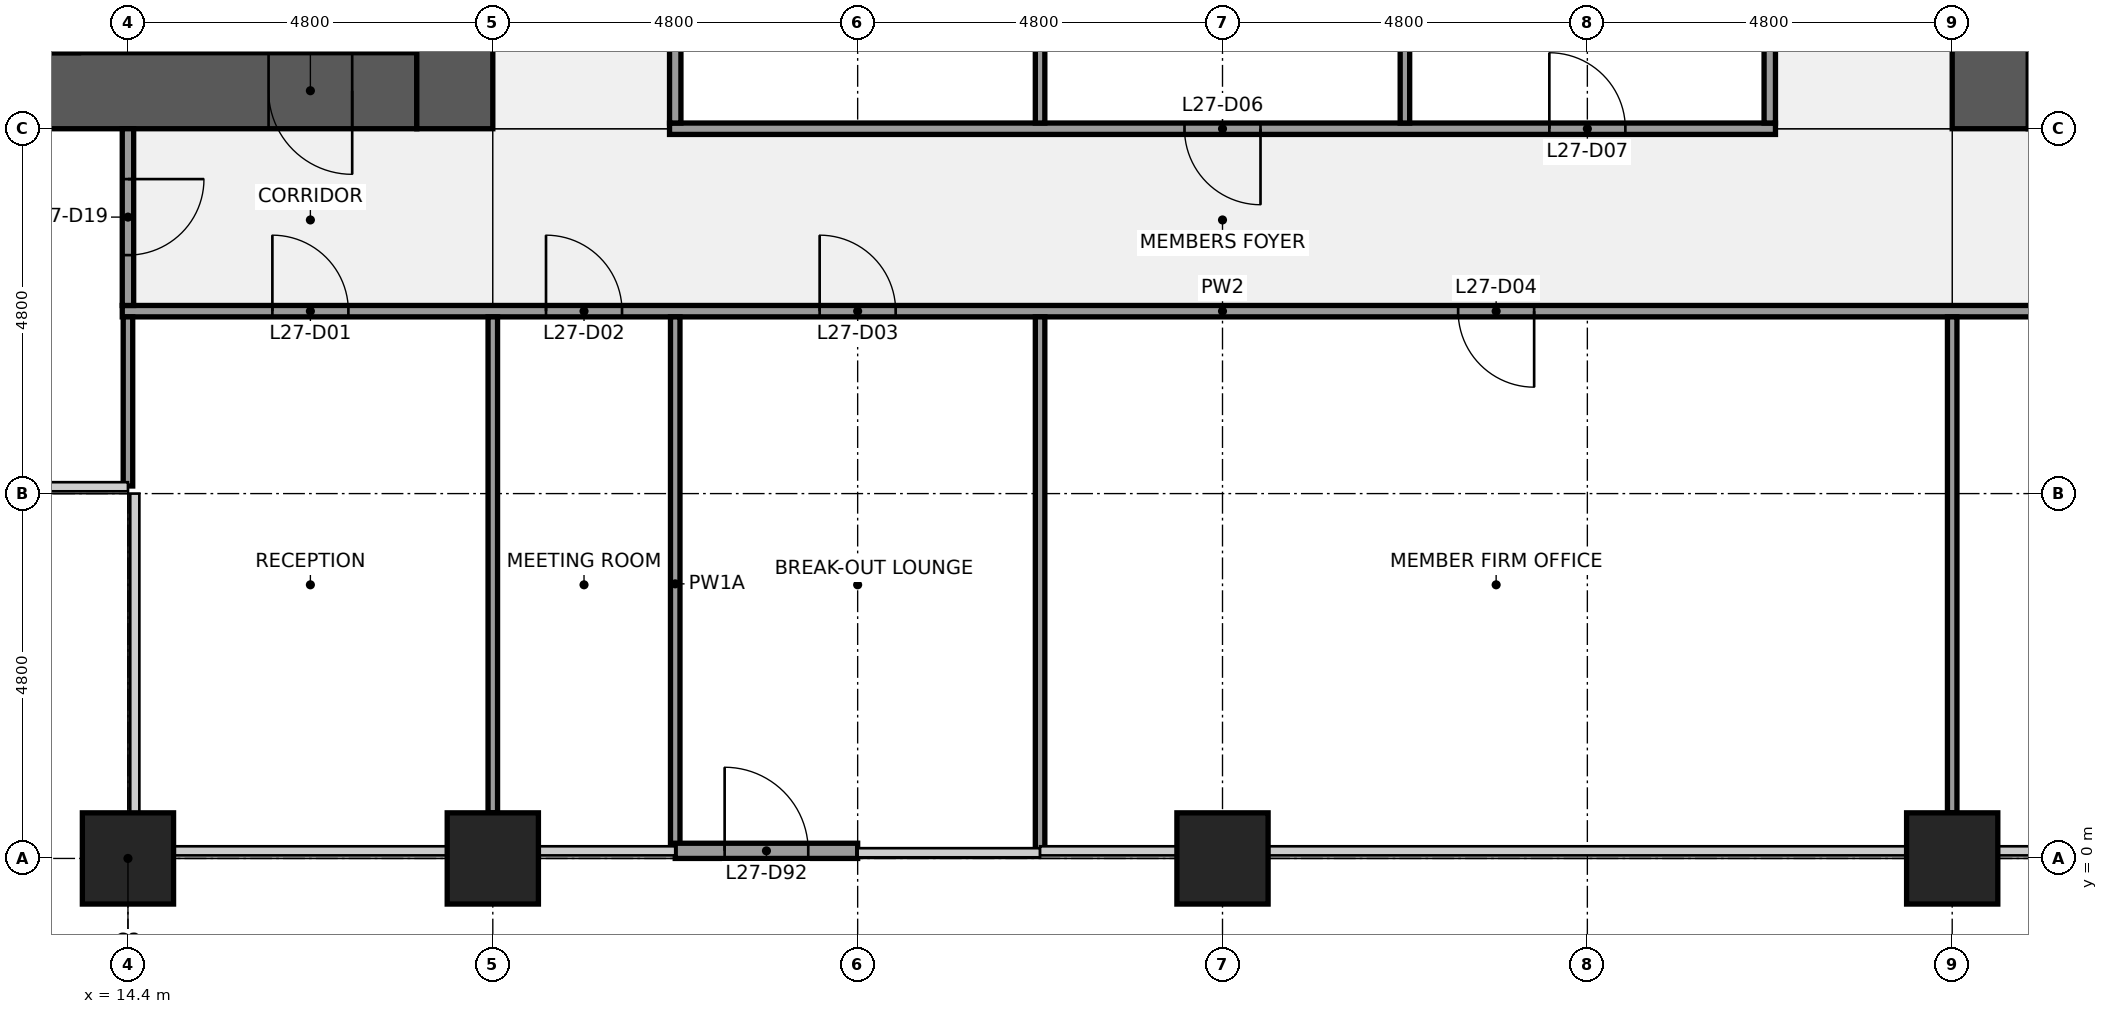
"""IFC4 building model, lengths in metres.
Left out: names, types, materials, properties, quantities, classifications, styles, units other than length and angle.
Written with IfcOpenShell. Run it as: python <this file> out.ifc"""

import sys

from ifc_helpers import new_model, si_unit, direction, frame, frame_2d, origin, origin_2d, place, context, subcontext, project, spatial, rectangle, extrude, element, fill, save


model = new_model("IFC4")
c1 = context("Model", 3, precision=1e-05, world=origin(), true_north=direction((0.0, 1.0)))
c2 = subcontext(c1, "Body", "Model", "MODEL_VIEW")
j1 = project(units=[si_unit("LENGTHUNIT", "METRE"), si_unit("PLANEANGLEUNIT", "RADIAN")], contexts=[c1])
p1 = place(None, origin())
s1 = spatial("IfcSite", under=j1, at=p1, CompositionType="ELEMENT")
p2 = place(p1, origin())
s2 = spatial("IfcBuilding", under=s1, at=p2, CompositionType="ELEMENT")
p3 = place(p2, frame((0.0, 0.0, 128.1)))
s3 = spatial("IfcBuildingStorey", under=s2, at=p3, CompositionType="ELEMENT", Elevation=128.1)
for number, where, z_axis, x_axis in (
    (1, (14.4, 0.0, 0.0), (0.0, 0.0, 1.0), (1.0, 0.0, 0.0)),
    (2, (19.2, 0.0, 0.0), (0.0, 0.0, 1.0), (1.0, 0.0, 0.0)),
    (3, (28.8, 0.0, 0.0), (0.0, 0.0, 1.0), (1.0, 0.0, 0.0)),
    (4, (38.4, 0.0, 0.0), (0.0, 0.0, 1.0), (1.0, 0.0, 0.0)),
):
    element("IfcColumn", number, at=place(p3, frame(where, z_axis=z_axis, x_axis=x_axis)), inside=s3, PredefinedType="COLUMN", context=c2, shape_type="SweptSolid", body=[
        extrude(rectangle(XDim=1.2, YDim=1.2, at=origin_2d()), origin(), (0.0, 0.0, 1.0), 4.0),
    ])
p4 = place(p3, frame((18.2, 10.1, 0.0), z_axis=(0.0, 0.0, 1.0), x_axis=(-1.0, 0.0, 0.0)))
e5 = element("IfcWall", 5, at=p4, inside=s3, PredefinedType="SHEAR", context=c2, shape_type="SweptSolid", body=[
    extrude(rectangle(XDim=8.6, YDim=1.0, at=frame_2d((4.3, 0.0))), origin(), (0.0, 0.0, 1.0), 3.84),
])
p5 = place(p4, frame((0.85, 0.0, 0.0)))
e6 = element("IfcOpeningElement", 6, at=p5, cuts=e5, PredefinedType="OPENING", context=c2, shape_type="SweptSolid", body=[
    extrude(rectangle(XDim=1.1, YDim=2.1, at=frame_2d((0.55, 1.05))), frame((0.0, 0.51, 0.0), z_axis=(0.0, -1.0, 0.0), x_axis=(1.0, 0.0, 0.0)), (0.0, 0.0, 1.0), 1.02),
])
p6 = place(p3, frame((18.7, 38.4, 0.0), z_axis=(0.0, 0.0, 1.0), x_axis=(0.0, -1.0, 0.0)))
e7 = element("IfcWall", 7, at=p6, inside=s3, PredefinedType="SHEAR", context=c2, shape_type="SweptSolid", body=[
    extrude(rectangle(XDim=28.8, YDim=1.0, at=frame_2d((14.4, 0.0))), origin(), (0.0, 0.0, 1.0), 3.84),
])
p7 = place(p6, frame((18.3, 0.0, 0.0)))
e8 = element("IfcOpeningElement", 8, at=p7, cuts=e7, PredefinedType="OPENING", context=c2, shape_type="SweptSolid", body=[
    extrude(rectangle(XDim=1.8, YDim=2.1, at=frame_2d((0.9, 1.05))), frame((0.0, 0.51, 0.0), z_axis=(0.0, -1.0, 0.0), x_axis=(1.0, 0.0, 0.0)), (0.0, 0.0, 1.0), 1.02),
])
p8 = place(p6, frame((8.7, 0.0, 0.0)))
e9 = element("IfcOpeningElement", 9, at=p8, cuts=e7, PredefinedType="OPENING", context=c2, shape_type="SweptSolid", body=[
    extrude(rectangle(XDim=1.8, YDim=2.1, at=frame_2d((0.9, 1.05))), frame((0.0, 0.51, 0.0), z_axis=(0.0, -1.0, 0.0), x_axis=(1.0, 0.0, 0.0)), (0.0, 0.0, 1.0), 1.02),
])
p9 = place(p3, frame((9.6, 10.7, 0.0), z_axis=(0.0, 0.0, 1.0), x_axis=(1.0, 0.0, 0.0)))
e10 = element("IfcWall", 10, at=p9, inside=s3, PredefinedType="SHEAR", context=c2, shape_type="SweptSolid", body=[
    extrude(rectangle(XDim=4.15, YDim=0.2, at=frame_2d((2.075, 0.0))), origin(), (0.0, 0.0, 1.0), 3.84),
])
p10 = place(p3, frame((38.9, 9.6, 0.0), z_axis=(0.0, 0.0, 1.0), x_axis=(0.0, 1.0, 0.0)))
e11 = element("IfcWall", 11, at=p10, inside=s3, PredefinedType="SHEAR", context=c2, shape_type="SweptSolid", body=[
    extrude(rectangle(XDim=28.8, YDim=1.0, at=frame_2d((14.4, 0.0))), origin(), (0.0, 0.0, 1.0), 3.84),
])
p11 = place(p10, frame((8.7, 0.0, 0.0)))
e12 = element("IfcOpeningElement", 12, at=p11, cuts=e11, PredefinedType="OPENING", context=c2, shape_type="SweptSolid", body=[
    extrude(rectangle(XDim=1.8, YDim=2.1, at=frame_2d((0.9, 1.05))), frame((0.0, 0.51, 0.0), z_axis=(0.0, -1.0, 0.0), x_axis=(1.0, 0.0, 0.0)), (0.0, 0.0, 1.0), 1.02),
])
p12 = place(p10, frame((18.3, 0.0, 0.0)))
e13 = element("IfcOpeningElement", 13, at=p12, cuts=e11, PredefinedType="OPENING", context=c2, shape_type="SweptSolid", body=[
    extrude(rectangle(XDim=1.8, YDim=2.1, at=frame_2d((0.9, 1.05))), frame((0.0, 0.51, 0.0), z_axis=(0.0, -1.0, 0.0), x_axis=(1.0, 0.0, 0.0)), (0.0, 0.0, 1.0), 1.02),
])
p13 = place(p3, frame((14.325, 7.2, 0.0), z_axis=(0.0, 0.0, 1.0), x_axis=(1.0, 0.0, 0.0)))
e14 = element("IfcWall", 14, at=p13, inside=s3, PredefinedType="PARTITIONING", context=c2, shape_type="SweptSolid", body=[
    extrude(rectangle(XDim=28.95, YDim=0.15, at=frame_2d((14.475, 0.0))), origin(), (0.0, 0.0, 1.0), 2.936),
])
p14 = place(p13, frame((1.975, 0.0, 0.0)))
e15 = element("IfcOpeningElement", 15, at=p14, cuts=e14, PredefinedType="OPENING", context=c2, shape_type="SweptSolid", body=[
    extrude(rectangle(XDim=1.0, YDim=2.1, at=frame_2d((0.5, 1.05))), frame((0.0, 0.085, 0.0), z_axis=(0.0, -1.0, 0.0), x_axis=(1.0, 0.0, 0.0)), (0.0, 0.0, 1.0), 0.17),
])
p15 = place(p13, frame((5.575, 0.0, 0.0)))
e16 = element("IfcOpeningElement", 16, at=p15, cuts=e14, PredefinedType="OPENING", context=c2, shape_type="SweptSolid", body=[
    extrude(rectangle(XDim=1.0, YDim=2.1, at=frame_2d((0.5, 1.05))), frame((0.0, 0.085, 0.0), z_axis=(0.0, -1.0, 0.0), x_axis=(1.0, 0.0, 0.0)), (0.0, 0.0, 1.0), 0.17),
])
p16 = place(p13, frame((9.175, 0.0, 0.0)))
e17 = element("IfcOpeningElement", 17, at=p16, cuts=e14, PredefinedType="OPENING", context=c2, shape_type="SweptSolid", body=[
    extrude(rectangle(XDim=1.0, YDim=2.1, at=frame_2d((0.5, 1.05))), frame((0.0, 0.085, 0.0), z_axis=(0.0, -1.0, 0.0), x_axis=(1.0, 0.0, 0.0)), (0.0, 0.0, 1.0), 0.17),
])
p17 = place(p13, frame((17.575, 0.0, 0.0)))
e18 = element("IfcOpeningElement", 18, at=p17, cuts=e14, PredefinedType="OPENING", context=c2, shape_type="SweptSolid", body=[
    extrude(rectangle(XDim=1.0, YDim=2.1, at=frame_2d((0.5, 1.05))), frame((0.0, 0.085, 0.0), z_axis=(0.0, -1.0, 0.0), x_axis=(1.0, 0.0, 0.0)), (0.0, 0.0, 1.0), 0.17),
])
p18 = place(p13, frame((25.975, 0.0, 0.0)))
e19 = element("IfcOpeningElement", 19, at=p18, cuts=e14, PredefinedType="OPENING", context=c2, shape_type="SweptSolid", body=[
    extrude(rectangle(XDim=1.0, YDim=2.1, at=frame_2d((0.5, 1.05))), frame((0.0, 0.085, 0.0), z_axis=(0.0, -1.0, 0.0), x_axis=(1.0, 0.0, 0.0)), (0.0, 0.0, 1.0), 0.17),
])
p19 = place(p3, frame((21.525, 9.6, 0.0), z_axis=(0.0, 0.0, 1.0), x_axis=(1.0, 0.0, 0.0)))
e20 = element("IfcWall", 20, at=p19, inside=s3, PredefinedType="PARTITIONING", context=c2, shape_type="SweptSolid", body=[
    extrude(rectangle(XDim=14.55, YDim=0.15, at=frame_2d((7.275, 0.0))), origin(), (0.0, 0.0, 1.0), 2.936),
])
p20 = place(p19, frame((6.775, 0.0, 0.0)))
e21 = element("IfcOpeningElement", 21, at=p20, cuts=e20, PredefinedType="OPENING", context=c2, shape_type="SweptSolid", body=[
    extrude(rectangle(XDim=1.0, YDim=2.1, at=frame_2d((0.5, 1.05))), frame((0.0, 0.085, 0.0), z_axis=(0.0, -1.0, 0.0), x_axis=(1.0, 0.0, 0.0)), (0.0, 0.0, 1.0), 0.17),
])
p21 = place(p19, frame((11.575, 0.0, 0.0)))
e22 = element("IfcOpeningElement", 22, at=p21, cuts=e20, PredefinedType="OPENING", context=c2, shape_type="SweptSolid", body=[
    extrude(rectangle(XDim=1.0, YDim=2.1, at=frame_2d((0.5, 1.05))), frame((0.0, 0.085, 0.0), z_axis=(0.0, -1.0, 0.0), x_axis=(1.0, 0.0, 0.0)), (0.0, 0.0, 1.0), 0.17),
])
p22 = place(p3, frame((14.4, 4.9, 0.0), z_axis=(0.0, 0.0, 1.0), x_axis=(0.0, 1.0, 0.0)))
e23 = element("IfcWall", 23, at=p22, inside=s3, PredefinedType="PARTITIONING", context=c2, shape_type="SweptSolid", body=[
    extrude(rectangle(XDim=2.225, YDim=0.125, at=frame_2d((1.113, 0.0))), origin(), (0.0, 0.0, 1.0), 2.936),
])
p23 = place(p3, frame((14.4, 7.275, 0.0), z_axis=(0.0, 0.0, 1.0), x_axis=(0.0, 1.0, 0.0)))
e24 = element("IfcWall", 24, at=p23, inside=s3, PredefinedType="PARTITIONING", context=c2, shape_type="SweptSolid", body=[
    extrude(rectangle(XDim=2.325, YDim=0.15, at=frame_2d((1.163, 0.0))), origin(), (0.0, 0.0, 1.0), 2.936),
])
p24 = place(p23, frame((0.663, 0.0, 0.0)))
e25 = element("IfcOpeningElement", 25, at=p24, cuts=e24, PredefinedType="OPENING", context=c2, shape_type="SweptSolid", body=[
    extrude(rectangle(XDim=1.0, YDim=2.1, at=frame_2d((0.5, 1.05))), frame((0.0, 0.085, 0.0), z_axis=(0.0, -1.0, 0.0), x_axis=(1.0, 0.0, 0.0)), (0.0, 0.0, 1.0), 0.17),
])
p25 = place(p3, frame((19.2, 0.6, 0.0), z_axis=(0.0, 0.0, 1.0), x_axis=(0.0, 1.0, 0.0)))
e26 = element("IfcWall", 26, at=p25, inside=s3, PredefinedType="PARTITIONING", context=c2, shape_type="SweptSolid", body=[
    extrude(rectangle(XDim=6.525, YDim=0.125, at=frame_2d((3.262, 0.0))), origin(), (0.0, 0.0, 1.0), 2.936),
])
p26 = place(p3, frame((21.6, 0.1, 0.0), z_axis=(0.0, 0.0, 1.0), x_axis=(0.0, 1.0, 0.0)))
e27 = element("IfcWall", 27, at=p26, inside=s3, PredefinedType="PARTITIONING", context=c2, shape_type="SweptSolid", body=[
    extrude(rectangle(XDim=7.025, YDim=0.125, at=frame_2d((3.512, 0.0))), origin(), (0.0, 0.0, 1.0), 2.936),
])
p27 = place(p3, frame((21.6, 9.675, 0.0), z_axis=(0.0, 0.0, 1.0), x_axis=(0.0, 1.0, 0.0)))
e28 = element("IfcWall", 28, at=p27, inside=s3, PredefinedType="PARTITIONING", context=c2, shape_type="SweptSolid", body=[
    extrude(rectangle(XDim=4.65, YDim=0.15, at=frame_2d((2.325, 0.0))), origin(), (0.0, 0.0, 1.0), 2.936),
])
p28 = place(p27, frame((1.825, 0.0, 0.0)))
e29 = element("IfcOpeningElement", 29, at=p28, cuts=e28, PredefinedType="OPENING", context=c2, shape_type="SweptSolid", body=[
    extrude(rectangle(XDim=1.0, YDim=2.1, at=frame_2d((0.5, 1.05))), frame((0.0, 0.085, 0.0), z_axis=(0.0, -1.0, 0.0), x_axis=(1.0, 0.0, 0.0)), (0.0, 0.0, 1.0), 0.17),
])
p29 = place(p3, frame((26.4, 0.1, 0.0), z_axis=(0.0, 0.0, 1.0), x_axis=(0.0, 1.0, 0.0)))
e30 = element("IfcWall", 30, at=p29, inside=s3, PredefinedType="PARTITIONING", context=c2, shape_type="SweptSolid", body=[
    extrude(rectangle(XDim=7.025, YDim=0.125, at=frame_2d((3.512, 0.0))), origin(), (0.0, 0.0, 1.0), 2.936),
])
for number, where, z_axis, x_axis in (
    (31, (26.4, 9.675, 0.0), (0.0, 0.0, 1.0), (0.0, 1.0, 0.0)),
    (32, (31.2, 9.675, 0.0), (0.0, 0.0, 1.0), (0.0, 1.0, 0.0)),
):
    element("IfcWall", number, at=place(p3, frame(where, z_axis=z_axis, x_axis=x_axis)), inside=s3, PredefinedType="PARTITIONING", context=c2, shape_type="SweptSolid", body=[
        extrude(rectangle(XDim=4.65, YDim=0.125, at=frame_2d((2.325, 0.0))), origin(), (0.0, 0.0, 1.0), 2.936),
    ])
p30 = place(p3, frame((36.0, 9.675, 0.0), z_axis=(0.0, 0.0, 1.0), x_axis=(0.0, 1.0, 0.0)))
e33 = element("IfcWall", 33, at=p30, inside=s3, PredefinedType="PARTITIONING", context=c2, shape_type="SweptSolid", body=[
    extrude(rectangle(XDim=4.65, YDim=0.15, at=frame_2d((2.325, 0.0))), origin(), (0.0, 0.0, 1.0), 2.936),
])
p31 = place(p3, frame((38.4, 0.6, 0.0), z_axis=(0.0, 0.0, 1.0), x_axis=(0.0, 1.0, 0.0)))
e34 = element("IfcWall", 34, at=p31, inside=s3, PredefinedType="PARTITIONING", context=c2, shape_type="SweptSolid", body=[
    extrude(rectangle(XDim=6.525, YDim=0.125, at=frame_2d((3.262, 0.0))), origin(), (0.0, 0.0, 1.0), 2.936),
])
p32 = place(p3, frame((21.6, 0.1, 0.0), z_axis=(0.0, 0.0, 1.0), x_axis=(1.0, 0.0, 0.0)))
e35 = element("IfcWall", 35, at=p32, inside=s3, PredefinedType="SOLIDWALL", context=c2, shape_type="SweptSolid", body=[
    extrude(rectangle(XDim=2.4, YDim=0.2, at=frame_2d((1.2, 0.0))), origin(), (0.0, 0.0, 1.0), 3.314),
])
p33 = place(p32, frame((0.65, 0.0, 0.0)))
e36 = element("IfcOpeningElement", 36, at=p33, cuts=e35, PredefinedType="OPENING", context=c2, shape_type="SweptSolid", body=[
    extrude(rectangle(XDim=1.1, YDim=2.1, at=frame_2d((0.55, 1.05))), frame((0.0, 0.11, 0.0), z_axis=(0.0, -1.0, 0.0), x_axis=(1.0, 0.0, 0.0)), (0.0, 0.0, 1.0), 0.22),
])
for number, where, z_axis, x_axis in (
    (37, (14.4, -1.05, 0.0), (0.0, 0.0, 1.0), (1.0, 0.0, 0.0)),
    (38, (19.2, -1.05, 0.0), (0.0, 0.0, 1.0), (1.0, 0.0, 0.0)),
    (39, (38.4, -1.05, 0.0), (0.0, 0.0, 1.0), (1.0, 0.0, 0.0)),
):
    element("IfcColumn", number, at=place(p3, frame(where, z_axis=z_axis, x_axis=x_axis)), inside=s3, PredefinedType="PILASTER", context=c2, shape_type="SweptSolid", body=[
        extrude(rectangle(XDim=3.6, YDim=0.9, at=origin_2d()), origin(), (0.0, 0.0, 1.0), 4.0),
    ])
p34 = place(p5, origin())
e40 = element("IfcDoor", 40, at=p34, inside=s3, OperationType="SINGLE_SWING_LEFT", PredefinedType="DOOR", context=c2, shape_type="SweptSolid", body=[
    extrude(rectangle(XDim=1.1, YDim=2.1, at=frame_2d((0.55, 1.05))), frame((0.0, 0.025, 0.0), z_axis=(0.0, -1.0, 0.0), x_axis=(1.0, 0.0, 0.0)), (0.0, 0.0, 1.0), 0.05),
])
fill(e6, e40)
p35 = place(p14, origin())
e41 = element("IfcDoor", 41, at=p35, inside=s3, OperationType="SINGLE_SWING_LEFT", PredefinedType="DOOR", context=c2, shape_type="SweptSolid", body=[
    extrude(rectangle(XDim=1.0, YDim=2.1, at=frame_2d((0.5, 1.05))), frame((0.0, 0.025, 0.0), z_axis=(0.0, -1.0, 0.0), x_axis=(1.0, 0.0, 0.0)), (0.0, 0.0, 1.0), 0.05),
])
fill(e15, e41)
p36 = place(p15, origin())
e42 = element("IfcDoor", 42, at=p36, inside=s3, OperationType="SINGLE_SWING_LEFT", PredefinedType="DOOR", context=c2, shape_type="SweptSolid", body=[
    extrude(rectangle(XDim=1.0, YDim=2.1, at=frame_2d((0.5, 1.05))), frame((0.0, 0.025, 0.0), z_axis=(0.0, -1.0, 0.0), x_axis=(1.0, 0.0, 0.0)), (0.0, 0.0, 1.0), 0.05),
])
fill(e16, e42)
p37 = place(p16, origin())
e43 = element("IfcDoor", 43, at=p37, inside=s3, OperationType="SINGLE_SWING_LEFT", PredefinedType="DOOR", context=c2, shape_type="SweptSolid", body=[
    extrude(rectangle(XDim=1.0, YDim=2.1, at=frame_2d((0.5, 1.05))), frame((0.0, 0.025, 0.0), z_axis=(0.0, -1.0, 0.0), x_axis=(1.0, 0.0, 0.0)), (0.0, 0.0, 1.0), 0.05),
])
fill(e17, e43)
p38 = place(p17, origin())
e44 = element("IfcDoor", 44, at=p38, inside=s3, OperationType="SINGLE_SWING_RIGHT", PredefinedType="DOOR", context=c2, shape_type="SweptSolid", body=[
    extrude(rectangle(XDim=1.0, YDim=2.1, at=frame_2d((0.5, 1.05))), frame((0.0, 0.025, 0.0), z_axis=(0.0, -1.0, 0.0), x_axis=(1.0, 0.0, 0.0)), (0.0, 0.0, 1.0), 0.05),
])
fill(e18, e44)
p39 = place(p20, origin())
e45 = element("IfcDoor", 45, at=p39, inside=s3, OperationType="SINGLE_SWING_RIGHT", PredefinedType="DOOR", context=c2, shape_type="SweptSolid", body=[
    extrude(rectangle(XDim=1.0, YDim=2.1, at=frame_2d((0.5, 1.05))), frame((0.0, 0.025, 0.0), z_axis=(0.0, -1.0, 0.0), x_axis=(1.0, 0.0, 0.0)), (0.0, 0.0, 1.0), 0.05),
])
fill(e21, e45)
p40 = place(p21, origin())
e46 = element("IfcDoor", 46, at=p40, inside=s3, OperationType="SINGLE_SWING_LEFT", PredefinedType="DOOR", context=c2, shape_type="SweptSolid", body=[
    extrude(rectangle(XDim=1.0, YDim=2.1, at=frame_2d((0.5, 1.05))), frame((0.0, 0.025, 0.0), z_axis=(0.0, -1.0, 0.0), x_axis=(1.0, 0.0, 0.0)), (0.0, 0.0, 1.0), 0.05),
])
fill(e22, e46)
p41 = place(p24, origin())
e47 = element("IfcDoor", 47, at=p41, inside=s3, OperationType="SINGLE_SWING_RIGHT", PredefinedType="DOOR", context=c2, shape_type="SweptSolid", body=[
    extrude(rectangle(XDim=1.0, YDim=2.1, at=frame_2d((0.5, 1.05))), frame((0.0, 0.025, 0.0), z_axis=(0.0, -1.0, 0.0), x_axis=(1.0, 0.0, 0.0)), (0.0, 0.0, 1.0), 0.05),
])
fill(e25, e47)
p42 = place(p33, origin())
e48 = element("IfcDoor", 48, at=p42, inside=s3, OperationType="SINGLE_SWING_LEFT", PredefinedType="DOOR", context=c2, shape_type="SweptSolid", body=[
    extrude(rectangle(XDim=1.1, YDim=2.1, at=frame_2d((0.55, 1.05))), frame((0.0, 0.025, 0.0), z_axis=(0.0, -1.0, 0.0), x_axis=(1.0, 0.0, 0.0)), (0.0, 0.0, 1.0), 0.05),
])
fill(e36, e48)
save(model, sys.argv[1])
